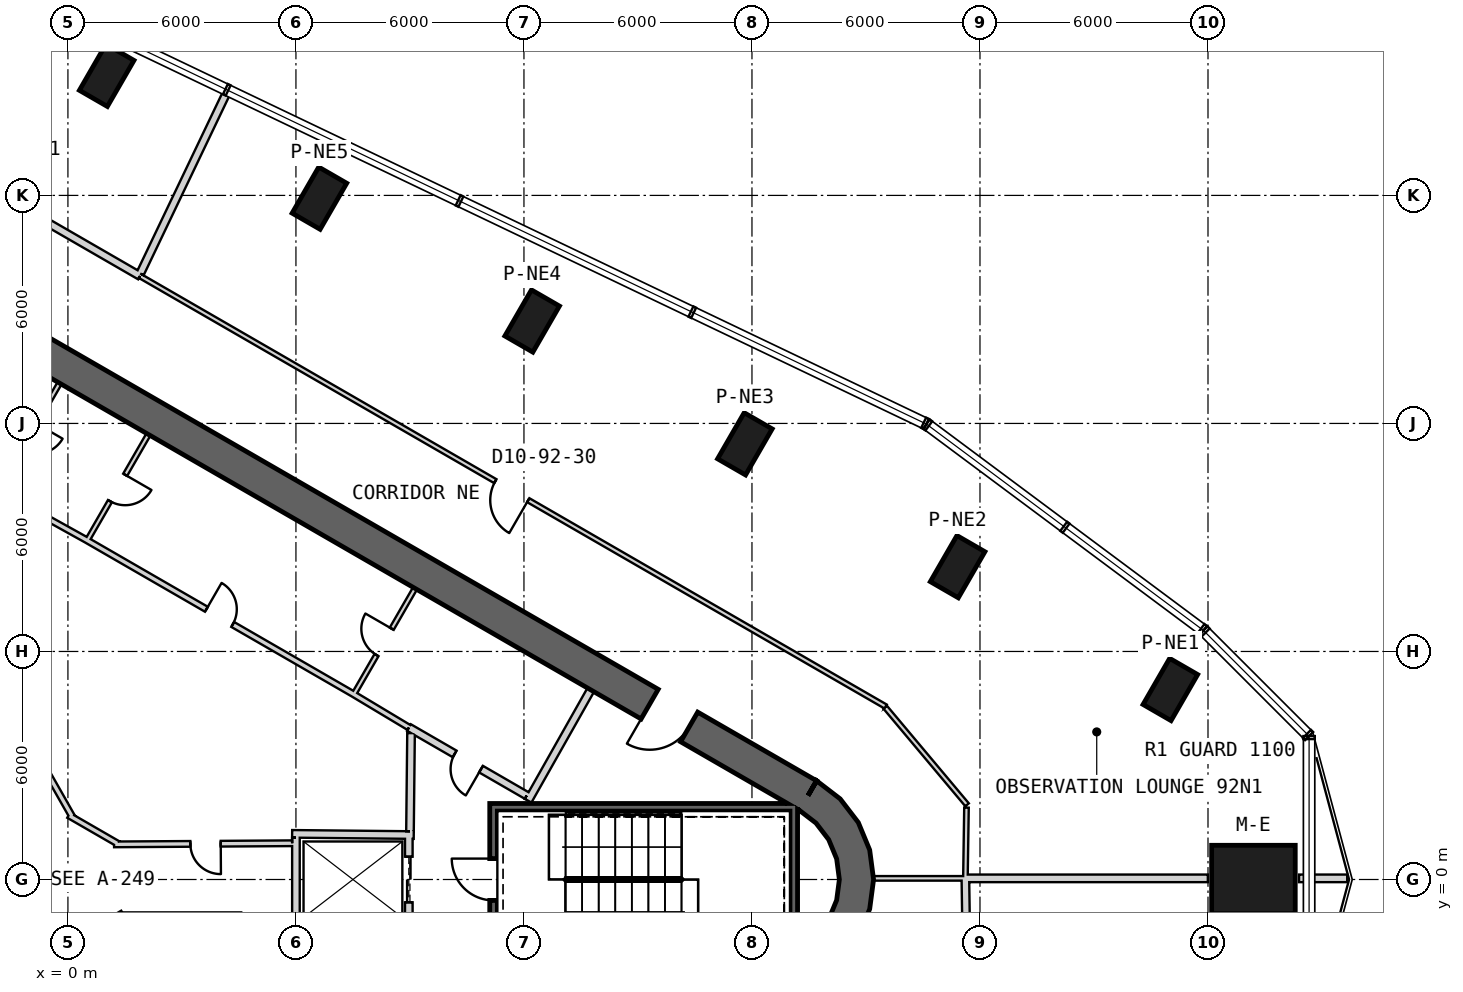
"""IFC4 building model, lengths in metres.
Left out: names, types, materials, properties, quantities, classifications, styles, units other than length and angle.
Written with IfcOpenShell. Run it as: python <this file> out.ifc"""

import sys

from ifc_helpers import new_model, si_unit, direction, frame, frame_2d, origin, origin_2d, place, context, subcontext, project, spatial, polyline, rectangle, outline, extrude, element, fill, save


model = new_model("IFC4")
c1 = context("Model", 3, precision=1e-05, world=origin(), true_north=direction((0.0, 1.0)))
c2 = subcontext(c1, "Body", "Model", "MODEL_VIEW")
j1 = project(units=[si_unit("LENGTHUNIT", "METRE"), si_unit("PLANEANGLEUNIT", "RADIAN")], contexts=[c1])
p1 = place(None, origin())
s1 = spatial("IfcSite", under=j1, at=p1, CompositionType="ELEMENT")
p2 = place(p1, origin())
s2 = spatial("IfcBuilding", under=s1, at=p2, CompositionType="ELEMENT")
p3 = place(p2, frame((0.0, 0.0, 404.8)))
s3 = spatial("IfcBuildingStorey", under=s2, at=p3, CompositionType="ELEMENT", Elevation=404.8)
p4 = place(p3, frame((31.196, 0.0, 0.0), z_axis=(0.0, 0.0, 1.0), x_axis=(1.0, 0.0, 0.0)))
e1 = element("IfcColumn", 1, at=p4, inside=s3, PredefinedType="COLUMN", context=c2, shape_type="SweptSolid", body=[
    extrude(rectangle(XDim=2.2, YDim=1.8, at=origin_2d()), origin(), (0.0, 0.0, 1.0), 5.25),
])
for number, where, z_axis, x_axis in (
    (2, (29.01, 4.999, 0.0), (0.0, 0.0, 1.0), (0.5, 0.866, 0.0)),
    (3, (23.412, 8.231, 0.0), (0.0, 0.0, 1.0), (0.5, 0.866, 0.0)),
    (4, (17.814, 11.463, 0.0), (0.0, 0.0, 1.0), (0.5, 0.866, 0.0)),
    (5, (12.216, 14.695, 0.0), (0.0, 0.0, 1.0), (0.5, 0.866, 0.0)),
    (6, (6.618, 17.927, 0.0), (0.0, 0.0, 1.0), (0.5, 0.866, 0.0)),
    (7, (1.02, 21.159, 0.0), (0.0, 0.0, 1.0), (0.5, 0.866, 0.0)),
):
    element("IfcColumn", number, at=place(p3, frame(where, z_axis=z_axis, x_axis=x_axis)), inside=s3, PredefinedType="COLUMN", context=c2, shape_type="SweptSolid", body=[
        extrude(rectangle(XDim=1.4, YDim=0.85, at=origin_2d()), origin(), (0.0, 0.0, 1.0), 5.25),
    ])
p5 = place(p3, frame((19.475, 2.208, 0.0), z_axis=(0.0, 0.0, 1.0), x_axis=(-0.866028369851, 0.499994862586, 0.0)))
e8 = element("IfcWall", 8, at=p5, inside=s3, PredefinedType="SHEAR", context=c2, shape_type="SweptSolid", body=[
    extrude(rectangle(XDim=31.523, YDim=0.9, at=frame_2d((15.762, 0.0))), origin(), (0.0, 0.0, 1.0), 5.5),
])
p6 = place(p5, frame((3.612, 0.0, 0.0)))
e9 = element("IfcOpeningElement", 9, at=p6, cuts=e8, PredefinedType="OPENING", context=c2, shape_type="SweptSolid", body=[
    extrude(rectangle(XDim=1.2, YDim=2.4, at=frame_2d((0.6, 1.2))), frame((0.0, 0.46, 0.0), z_axis=(0.0, -1.0, 0.0), x_axis=(1.0, 0.0, 0.0)), (0.0, 0.0, 1.0), 0.92),
])
p7 = place(p5, frame((26.712, 0.0, 0.0)))
e10 = element("IfcOpeningElement", 10, at=p7, cuts=e8, PredefinedType="OPENING", context=c2, shape_type="SweptSolid", body=[
    extrude(rectangle(XDim=1.2, YDim=2.4, at=frame_2d((0.6, 1.2))), frame((0.0, 0.46, 0.0), z_axis=(0.0, -1.0, 0.0), x_axis=(1.0, 0.0, 0.0)), (0.0, 0.0, 1.0), 0.92),
])
p8 = place(p3, origin())
e11 = element("IfcWall", 11, at=p8, inside=s3, PredefinedType="SHEAR", context=c2, shape_type="SweptSolid", body=[
    extrude(outline(polyline([(19.7, -2.598), (20.321, -2.121), (20.798, -1.5), (21.098, -0.777), (21.2, 0.0), (21.098, 0.777), (20.798, 1.5), (20.321, 2.121), (19.7, 2.598), (19.25, 1.819), (19.685, 1.485), (20.019, 1.05), (20.229, 0.543), (20.3, 0.0), (20.229, -0.543), (20.019, -1.05), (19.685, -1.485), (19.25, -1.819), (19.7, -2.598)])), origin(), (0.0, 0.0, 1.0), 5.5),
])
p9 = place(p3, frame((19.2, 1.9, -0.3), z_axis=(0.0, 0.0, 1.0), x_axis=(-1.0, 0.0, 0.0)))
e12 = element("IfcWall", 12, at=p9, inside=s3, PredefinedType="SHEAR", context=c2, shape_type="SweptSolid", body=[
    extrude(rectangle(XDim=8.1, YDim=0.2, at=frame_2d((4.05, 0.0))), origin(), (0.0, 0.0, 1.0), 5.55),
])
p10 = place(p3, frame((19.1, -2.0, -0.3), z_axis=(0.0, 0.0, 1.0), x_axis=(0.0, 1.0, 0.0)))
e13 = element("IfcWall", 13, at=p10, inside=s3, PredefinedType="SHEAR", context=c2, shape_type="SweptSolid", body=[
    extrude(rectangle(XDim=3.8, YDim=0.2, at=frame_2d((1.9, 0.0))), origin(), (0.0, 0.0, 1.0), 5.55),
])
p11 = place(p3, frame((11.2, -1.8, -0.3), z_axis=(0.0, 0.0, 1.0), x_axis=(0.0, 1.0, 0.0)))
e14 = element("IfcWall", 14, at=p11, inside=s3, PredefinedType="SHEAR", context=c2, shape_type="SweptSolid", body=[
    extrude(rectangle(XDim=3.6, YDim=0.2, at=frame_2d((1.8, 0.0))), origin(), (0.0, 0.0, 1.0), 5.55),
])
p12 = place(p11, frame((1.25, 0.0, 0.3)))
e15 = element("IfcOpeningElement", 15, at=p12, cuts=e14, PredefinedType="OPENING", context=c2, shape_type="SweptSolid", body=[
    extrude(rectangle(XDim=1.1, YDim=2.1, at=frame_2d((0.55, 1.05))), frame((0.0, 0.11, 0.0), z_axis=(0.0, -1.0, 0.0), x_axis=(1.0, 0.0, 0.0)), (0.0, 0.0, 1.0), 0.22),
])
p13 = place(p3, frame((8.97, 1.2, 0.0), z_axis=(0.0, 0.0, 1.0), x_axis=(0.0, -1.0, 0.0)))
e16 = element("IfcWall", 16, at=p13, inside=s3, PredefinedType="PLUMBINGWALL", context=c2, shape_type="SweptSolid", body=[
    extrude(rectangle(XDim=2.4, YDim=0.2, at=frame_2d((1.2, 0.0))), origin(), (0.0, 0.0, 1.0), 5.25),
])
p14 = place(p13, frame((0.6, 0.0, 0.0)))
e17 = element("IfcOpeningElement", 17, at=p14, cuts=e16, PredefinedType="OPENING", context=c2, shape_type="SweptSolid", body=[
    extrude(rectangle(XDim=1.2, YDim=2.4, at=frame_2d((0.6, 1.2))), frame((0.0, 0.11, 0.0), z_axis=(0.0, -1.0, 0.0), x_axis=(1.0, 0.0, 0.0)), (0.0, 0.0, 1.0), 0.22),
])
p15 = place(p3, frame((6.0, -1.1, 0.0), z_axis=(0.0, 0.0, 1.0), x_axis=(0.0, 1.0, 0.0)))
e18 = element("IfcWall", 18, at=p15, inside=s3, PredefinedType="PLUMBINGWALL", context=c2, shape_type="SweptSolid", body=[
    extrude(rectangle(XDim=2.2, YDim=0.2, at=frame_2d((1.1, 0.0))), origin(), (0.0, 0.0, 1.0), 5.25),
])
p16 = place(p3, frame((5.9, 1.201, 0.0), z_axis=(0.0, 0.0, 1.0), x_axis=(0.999950064753, -0.009993397809, 0.0)))
e19 = element("IfcWall", 19, at=p16, inside=s3, PredefinedType="PLUMBINGWALL", context=c2, shape_type="SweptSolid", body=[
    extrude(rectangle(XDim=3.2, YDim=0.2, at=frame_2d((1.6, 0.0))), origin(), (0.0, 0.0, 1.0), 5.25),
])
p17 = place(p3, frame((7.508, 4.845, 0.0), z_axis=(0.0, 0.0, 1.0), x_axis=(0.500017246033, 0.866015446554, 0.0)))
e20 = element("IfcWall", 20, at=p17, inside=s3, PredefinedType="PARTITIONING", context=c2, shape_type="SweptSolid", body=[
    extrude(rectangle(XDim=3.25, YDim=0.12, at=frame_2d((1.625, 0.0))), origin(), (0.0, 0.0, 1.0), 5.25),
])
p18 = place(p17, frame((1.225, 0.0, 0.0)))
e21 = element("IfcOpeningElement", 21, at=p18, cuts=e20, PredefinedType="OPENING", context=c2, shape_type="SweptSolid", body=[
    extrude(rectangle(XDim=0.8, YDim=2.1, at=frame_2d((0.4, 1.05))), frame((0.0, 0.07, 0.0), z_axis=(0.0, -1.0, 0.0), x_axis=(1.0, 0.0, 0.0)), (0.0, 0.0, 1.0), 0.14),
])
p19 = place(p3, frame((12.11, 2.073, 0.0), z_axis=(0.0, 0.0, 1.0), x_axis=(0.49196600604, 0.870614408852, 0.0)))
e22 = element("IfcWall", 22, at=p19, inside=s3, PredefinedType="PARTITIONING", context=c2, shape_type="SweptSolid", body=[
    extrude(rectangle(XDim=3.35, YDim=0.2, at=frame_2d((1.675, 0.0))), origin(), (0.0, 0.0, 1.0), 5.25),
])
p20 = place(p3, frame((8.974, 3.999, 0.0), z_axis=(0.0, 0.0, 1.0), x_axis=(0.86601284211, -0.500021756827, 0.0)))
e23 = element("IfcWall", 23, at=p20, inside=s3, PredefinedType="PARTITIONING", context=c2, shape_type="SweptSolid", body=[
    extrude(rectangle(XDim=3.577, YDim=0.2, at=frame_2d((1.789, 0.0))), origin(), (0.0, 0.0, 1.0), 5.25),
])
p21 = place(p20, frame((1.389, 0.0, 0.0)))
e24 = element("IfcOpeningElement", 24, at=p21, cuts=e23, PredefinedType="OPENING", context=c2, shape_type="SweptSolid", body=[
    extrude(rectangle(XDim=0.8, YDim=2.1, at=frame_2d((0.4, 1.05))), frame((0.0, 0.11, 0.0), z_axis=(0.0, -1.0, 0.0), x_axis=(1.0, 0.0, 0.0)), (0.0, 0.0, 1.0), 0.22),
])
p22 = place(p3, frame((8.975, 4.0, 0.0), z_axis=(0.0, 0.0, 1.0), x_axis=(-0.857530436795, 0.514433231791, 0.0)))
e25 = element("IfcWall", 25, at=p22, inside=s3, PredefinedType="PLUMBINGWALL", context=c2, shape_type="SweptSolid", body=[
    extrude(rectangle(XDim=1.723, YDim=0.15, at=frame_2d((0.861, 0.0))), origin(), (0.0, 0.0, 1.0), 5.25),
])
p23 = place(p3, frame((2.119, 11.709, 0.0), z_axis=(0.0, 0.0, 1.0), x_axis=(-0.500017246033, -0.866015446554, 0.0)))
e26 = element("IfcWall", 26, at=p23, inside=s3, PredefinedType="PARTITIONING", context=c2, shape_type="SweptSolid", body=[
    extrude(rectangle(XDim=3.25, YDim=0.12, at=frame_2d((1.625, 0.0))), origin(), (0.0, 0.0, 1.0), 5.25),
])
p24 = place(p23, frame((1.225, 0.0, 0.0)))
e27 = element("IfcOpeningElement", 27, at=p24, cuts=e26, PredefinedType="OPENING", context=c2, shape_type="SweptSolid", body=[
    extrude(rectangle(XDim=0.8, YDim=2.1, at=frame_2d((0.4, 1.05))), frame((0.0, 0.07, 0.0), z_axis=(0.0, -1.0, 0.0), x_axis=(1.0, 0.0, 0.0)), (0.0, 0.0, 1.0), 0.14),
])
p25 = place(p3, frame((7.497, 4.886, 0.0), z_axis=(0.0, 0.0, 1.0), x_axis=(-0.866030989016, 0.499990325971, 0.0)))
e28 = element("IfcWall", 28, at=p25, inside=s3, PredefinedType="PLUMBINGWALL", context=c2, shape_type="SweptSolid", body=[
    extrude(rectangle(XDim=8.1, YDim=0.15, at=frame_2d((4.05, 0.0))), origin(), (0.0, 0.0, 1.0), 5.25),
])
p26 = place(p25, frame((3.65, 0.0, 0.0)))
e29 = element("IfcOpeningElement", 29, at=p26, cuts=e28, PredefinedType="OPENING", context=c2, shape_type="SweptSolid", body=[
    extrude(rectangle(XDim=0.8, YDim=2.1, at=frame_2d((0.4, 1.05))), frame((0.0, 0.085, 0.0), z_axis=(0.0, -1.0, 0.0), x_axis=(1.0, 0.0, 0.0)), (0.0, 0.0, 1.0), 0.17),
])
p27 = place(p3, frame((-0.22, 13.06, 0.0), z_axis=(0.0, 0.0, 1.0), x_axis=(-0.499984717929, -0.866034226713, 0.0)))
e30 = element("IfcWall", 30, at=p27, inside=s3, PredefinedType="PARTITIONING", context=c2, shape_type="SweptSolid", body=[
    extrude(rectangle(XDim=3.25, YDim=0.12, at=frame_2d((1.625, 0.0))), origin(), (0.0, 0.0, 1.0), 5.25),
])
p28 = place(p27, frame((1.225, 0.0, 0.0)))
e31 = element("IfcOpeningElement", 31, at=p28, cuts=e30, PredefinedType="OPENING", context=c2, shape_type="SweptSolid", body=[
    extrude(rectangle(XDim=0.8, YDim=2.1, at=frame_2d((0.4, 1.05))), frame((0.0, 0.07, 0.0), z_axis=(0.0, -1.0, 0.0), x_axis=(1.0, 0.0, 0.0)), (0.0, 0.0, 1.0), 0.14),
])
p29 = place(p3, frame((0.483, 8.936, 0.0), z_axis=(0.0, 0.0, 1.0), x_axis=(-0.874315691004, 0.485357674776, 0.0)))
e32 = element("IfcWall", 32, at=p29, inside=s3, PredefinedType="PLUMBINGWALL", context=c2, shape_type="SweptSolid", body=[
    extrude(rectangle(XDim=1.671, YDim=0.15, at=frame_2d((0.836, 0.0))), origin(), (0.0, 0.0, 1.0), 5.25),
])
p30 = place(p3, frame((9.001, 1.27, 0.0), z_axis=(0.0, 0.0, 1.0), x_axis=(0.010780534828, 0.999941888346, 0.0)))
e33 = element("IfcWall", 33, at=p30, inside=s3, PredefinedType="PARTITIONING", context=c2, shape_type="SweptSolid", body=[
    extrude(rectangle(XDim=2.582, YDim=0.2, at=frame_2d((1.291, 0.0))), origin(), (0.0, 0.0, 1.0), 5.25),
])
p31 = place(p3, frame((1.214, 0.924, 0.0), z_axis=(0.0, 0.0, 1.0), x_axis=(0.999979796062, 0.006356686907, 0.0)))
e34 = element("IfcWall", 34, at=p31, inside=s3, PredefinedType="PLUMBINGWALL", context=c2, shape_type="SweptSolid", body=[
    extrude(rectangle(XDim=4.686, YDim=0.15, at=frame_2d((2.343, 0.0))), origin(), (0.0, 0.0, 1.0), 5.25),
])
p32 = place(p31, frame((2.007, 0.0, 0.0)))
e35 = element("IfcOpeningElement", 35, at=p32, cuts=e34, PredefinedType="OPENING", context=c2, shape_type="SweptSolid", body=[
    extrude(rectangle(XDim=0.8, YDim=2.1, at=frame_2d((0.4, 1.05))), frame((0.0, 0.085, 0.0), z_axis=(0.0, -1.0, 0.0), x_axis=(1.0, 0.0, 0.0)), (0.0, 0.0, 1.0), 0.17),
])
p33 = place(p3, frame((0.019, 1.689, 0.0), z_axis=(0.0, 0.0, 1.0), x_axis=(0.866047774678, -0.499961250474, 0.0)))
e36 = element("IfcWall", 36, at=p33, inside=s3, PredefinedType="PLUMBINGWALL", context=c2, shape_type="SweptSolid", body=[
    extrude(rectangle(XDim=1.504, YDim=0.15, at=frame_2d((0.752, 0.0))), origin(), (0.0, 0.0, 1.0), 5.25),
])
p34 = place(p3, frame((-2.124, 5.586, 0.0), z_axis=(0.0, 0.0, 1.0), x_axis=(0.494514430604, -0.869169418424, 0.0)))
e37 = element("IfcWall", 37, at=p34, inside=s3, PredefinedType="PLUMBINGWALL", context=c2, shape_type="SweptSolid", body=[
    extrude(rectangle(XDim=4.534, YDim=0.15, at=frame_2d((2.267, 0.0))), origin(), (0.0, 0.0, 1.0), 5.25),
])
p35 = place(p3, frame((1.432, -0.873, 0.0), z_axis=(0.0, 0.0, 1.0), x_axis=(-0.866029572143, -0.499992780121, 0.0)))
e38 = element("IfcWall", 38, at=p35, inside=s3, PredefinedType="PARTITIONING", context=c2, shape_type="SweptSolid", body=[
    extrude(rectangle(XDim=1.485, YDim=0.12, at=frame_2d((0.743, 0.0))), origin(), (0.0, 0.0, 1.0), 5.25),
])
p36 = place(p3, frame((4.56, -0.925, 0.0), z_axis=(0.0, 0.0, 1.0), x_axis=(-1.0, 0.0, 0.0)))
e39 = element("IfcWall", 39, at=p36, inside=s3, PredefinedType="PARTITIONING", context=c2, shape_type="SweptSolid", body=[
    extrude(rectangle(XDim=3.199, YDim=0.12, at=frame_2d((1.6, 0.0))), origin(), (0.0, 0.0, 1.0), 5.25),
])
p37 = place(p3, frame((21.518, 4.551, 0.0), z_axis=(0.0, 0.0, 1.0), x_axis=(-0.866022813823, 0.500004485919, 0.0)))
e40 = element("IfcWall", 40, at=p37, inside=s3, PredefinedType="PARTITIONING", context=c2, shape_type="SweptSolid", body=[
    extrude(rectangle(XDim=22.655, YDim=0.12, at=frame_2d((11.327, 0.0))), origin(), (0.0, 0.0, 1.0), 5.25),
])
p38 = place(p37, frame((10.86, 0.0, 0.0)))
e41 = element("IfcOpeningElement", 41, at=p38, cuts=e40, PredefinedType="OPENING", context=c2, shape_type="SweptSolid", body=[
    extrude(rectangle(XDim=1.0, YDim=2.1, at=frame_2d((0.5, 1.05))), frame((0.0, 0.07, 0.0), z_axis=(0.0, -1.0, 0.0), x_axis=(1.0, 0.0, 0.0)), (0.0, 0.0, 1.0), 0.14),
])
p39 = place(p3, frame((23.661, 1.965, 0.0), z_axis=(0.0, 0.0, 1.0), x_axis=(-0.642772118723, 0.766057441314, 0.0)))
e42 = element("IfcWall", 42, at=p39, inside=s3, PredefinedType="PARTITIONING", context=c2, shape_type="SweptSolid", body=[
    extrude(rectangle(XDim=3.354, YDim=0.12, at=frame_2d((1.677, 0.0))), origin(), (0.0, 0.0, 1.0), 5.25),
])
p40 = place(p3, frame((23.616, 0.0, 0.0), z_axis=(0.0, 0.0, 1.0), x_axis=(0.015106746995, 0.999885886587, 0.0)))
e43 = element("IfcWall", 43, at=p40, inside=s3, PredefinedType="PARTITIONING", context=c2, shape_type="SweptSolid", body=[
    extrude(rectangle(XDim=1.891, YDim=0.12, at=frame_2d((0.945, 0.0))), origin(), (0.0, 0.0, 1.0), 3.02),
])
p41 = place(p3, frame((1.898, 15.878, 0.0), z_axis=(0.0, 0.0, 1.0), x_axis=(-0.866032067792, 0.499988457423, 0.0)))
e44 = element("IfcWall", 44, at=p41, inside=s3, PredefinedType="PARTITIONING", context=c2, shape_type="SweptSolid", body=[
    extrude(rectangle(XDim=9.905, YDim=0.2, at=frame_2d((4.952, 0.0))), origin(), (0.0, 0.0, 1.0), 5.25),
])
p42 = place(p41, frame((4.456, 0.0, 0.0)))
e45 = element("IfcOpeningElement", 45, at=p42, cuts=e44, PredefinedType="OPENING", context=c2, shape_type="SweptSolid", body=[
    extrude(rectangle(XDim=1.0, YDim=2.1, at=frame_2d((0.5, 1.05))), frame((0.0, 0.11, 0.0), z_axis=(0.0, -1.0, 0.0), x_axis=(1.0, 0.0, 0.0)), (0.0, 0.0, 1.0), 0.22),
])
p43 = place(p3, frame((23.646, 0.03, 0.0), z_axis=(0.0, 0.0, 1.0), x_axis=(-1.0, 0.0, 0.0)))
e46 = element("IfcWall", 46, at=p43, inside=s3, PredefinedType="PARTITIONING", context=c2, shape_type="SweptSolid", body=[
    extrude(rectangle(XDim=2.6, YDim=0.12, at=frame_2d((1.3, 0.0))), origin(), (0.0, 0.0, 1.0), 3.02),
])
p44 = place(p3, frame((4.207, 20.766, 0.0), z_axis=(0.0, 0.0, 1.0), x_axis=(-0.431059382244, -0.902323561135, 0.0)))
e47 = element("IfcWall", 47, at=p44, inside=s3, PredefinedType="PARTITIONING", context=c2, shape_type="SweptSolid", body=[
    extrude(rectangle(XDim=5.344, YDim=0.2, at=frame_2d((2.672, 0.0))), origin(), (0.0, 0.0, 1.0), 5.25),
])
p45 = place(p3, frame((23.646, 0.03, 0.0), z_axis=(0.0, 0.0, 1.0), x_axis=(1.0, 0.0, 0.0)))
e48 = element("IfcWall", 48, at=p45, inside=s3, PredefinedType="PARTITIONING", context=c2, shape_type="SweptSolid", body=[
    extrude(rectangle(XDim=6.349, YDim=0.2, at=frame_2d((3.175, 0.0))), origin(), (0.0, 0.0, 1.0), 3.02),
])
p46 = place(p3, frame((32.396, 0.03, 0.0), z_axis=(0.0, 0.0, 1.0), x_axis=(1.0, 0.0, 0.0)))
e49 = element("IfcWall", 49, at=p46, inside=s3, PredefinedType="PARTITIONING", context=c2, shape_type="SweptSolid", body=[
    extrude(rectangle(XDim=1.268, YDim=0.2, at=frame_2d((0.634, 0.0))), origin(), (0.0, 0.0, 1.0), 5.25),
])
p47 = place(p3, frame((23.647, -2.02, 0.0), z_axis=(0.0, 0.0, 1.0), x_axis=(-0.015109493549, 0.999885845087, 0.0)))
e50 = element("IfcWall", 50, at=p47, inside=s3, PredefinedType="PARTITIONING", context=c2, shape_type="SweptSolid", body=[
    extrude(rectangle(XDim=2.02, YDim=0.2, at=frame_2d((1.01, 0.0))), origin(), (0.0, 0.0, 1.0), 3.02),
])
p48 = place(p12, origin())
e51 = element("IfcDoor", 51, at=p48, inside=s3, OperationType="SINGLE_SWING_RIGHT", PredefinedType="USERDEFINED", context=c2, shape_type="SweptSolid", body=[
    extrude(rectangle(XDim=1.1, YDim=2.1, at=frame_2d((0.55, 1.05))), frame((0.0, 0.025, 0.0), z_axis=(0.0, -1.0, 0.0), x_axis=(1.0, 0.0, 0.0)), (0.0, 0.0, 1.0), 0.05),
])
fill(e15, e51)
p49 = place(p14, origin())
e52 = element("IfcDoor", 52, at=p49, inside=s3, OperationType="SLIDING_TO_LEFT", PredefinedType="USERDEFINED", context=c2, shape_type="SweptSolid", body=[
    extrude(rectangle(XDim=1.2, YDim=2.4, at=frame_2d((0.6, 1.2))), frame((0.0, 0.025, 0.0), z_axis=(0.0, -1.0, 0.0), x_axis=(1.0, 0.0, 0.0)), (0.0, 0.0, 1.0), 0.05),
])
fill(e17, e52)
p50 = place(p32, origin())
e53 = element("IfcDoor", 53, at=p50, inside=s3, OperationType="SINGLE_SWING_RIGHT", PredefinedType="USERDEFINED", context=c2, shape_type="SweptSolid", body=[
    extrude(rectangle(XDim=0.8, YDim=2.1, at=frame_2d((0.4, 1.05))), frame((0.0, 0.025, 0.0), z_axis=(0.0, -1.0, 0.0), x_axis=(1.0, 0.0, 0.0)), (0.0, 0.0, 1.0), 0.05),
])
fill(e35, e53)
p51 = place(p21, origin())
e54 = element("IfcDoor", 54, at=p51, inside=s3, OperationType="SINGLE_SWING_RIGHT", PredefinedType="USERDEFINED", context=c2, shape_type="SweptSolid", body=[
    extrude(rectangle(XDim=0.8, YDim=2.1, at=frame_2d((0.4, 1.05))), frame((0.0, 0.025, 0.0), z_axis=(0.0, -1.0, 0.0), x_axis=(1.0, 0.0, 0.0)), (0.0, 0.0, 1.0), 0.05),
])
fill(e24, e54)
p52 = place(p24, origin())
e55 = element("IfcDoor", 55, at=p52, inside=s3, OperationType="SINGLE_SWING_LEFT", PredefinedType="USERDEFINED", context=c2, shape_type="SweptSolid", body=[
    extrude(rectangle(XDim=0.8, YDim=2.1, at=frame_2d((0.4, 1.05))), frame((0.0, 0.025, 0.0), z_axis=(0.0, -1.0, 0.0), x_axis=(1.0, 0.0, 0.0)), (0.0, 0.0, 1.0), 0.05),
])
fill(e27, e55)
p53 = place(p26, origin())
e56 = element("IfcDoor", 56, at=p53, inside=s3, OperationType="SINGLE_SWING_RIGHT", PredefinedType="USERDEFINED", context=c2, shape_type="SweptSolid", body=[
    extrude(rectangle(XDim=0.8, YDim=2.1, at=frame_2d((0.4, 1.05))), frame((0.0, 0.025, 0.0), z_axis=(0.0, -1.0, 0.0), x_axis=(1.0, 0.0, 0.0)), (0.0, 0.0, 1.0), 0.05),
])
fill(e29, e56)
p54 = place(p38, origin())
e57 = element("IfcDoor", 57, at=p54, inside=s3, OperationType="SINGLE_SWING_LEFT", PredefinedType="NOTDEFINED", context=c2, shape_type="SweptSolid", body=[
    extrude(rectangle(XDim=1.0, YDim=2.1, at=frame_2d((0.5, 1.05))), frame((0.0, 0.025, 0.0), z_axis=(0.0, -1.0, 0.0), x_axis=(1.0, 0.0, 0.0)), (0.0, 0.0, 1.0), 0.05),
])
fill(e41, e57)
p55 = place(p18, origin())
e58 = element("IfcDoor", 58, at=p55, inside=s3, OperationType="SINGLE_SWING_RIGHT", PredefinedType="USERDEFINED", context=c2, shape_type="SweptSolid", body=[
    extrude(rectangle(XDim=0.8, YDim=2.1, at=frame_2d((0.4, 1.05))), frame((0.0, 0.025, 0.0), z_axis=(0.0, -1.0, 0.0), x_axis=(1.0, 0.0, 0.0)), (0.0, 0.0, 1.0), 0.05),
])
fill(e21, e58)
p56 = place(p6, origin())
e59 = element("IfcDoor", 59, at=p56, inside=s3, OperationType="SINGLE_SWING_RIGHT", PredefinedType="USERDEFINED", context=c2, shape_type="SweptSolid", body=[
    extrude(rectangle(XDim=1.2, YDim=2.4, at=frame_2d((0.6, 1.2))), frame((0.0, 0.025, 0.0), z_axis=(0.0, -1.0, 0.0), x_axis=(1.0, 0.0, 0.0)), (0.0, 0.0, 1.0), 0.05),
])
fill(e9, e59)
save(model, sys.argv[1])
